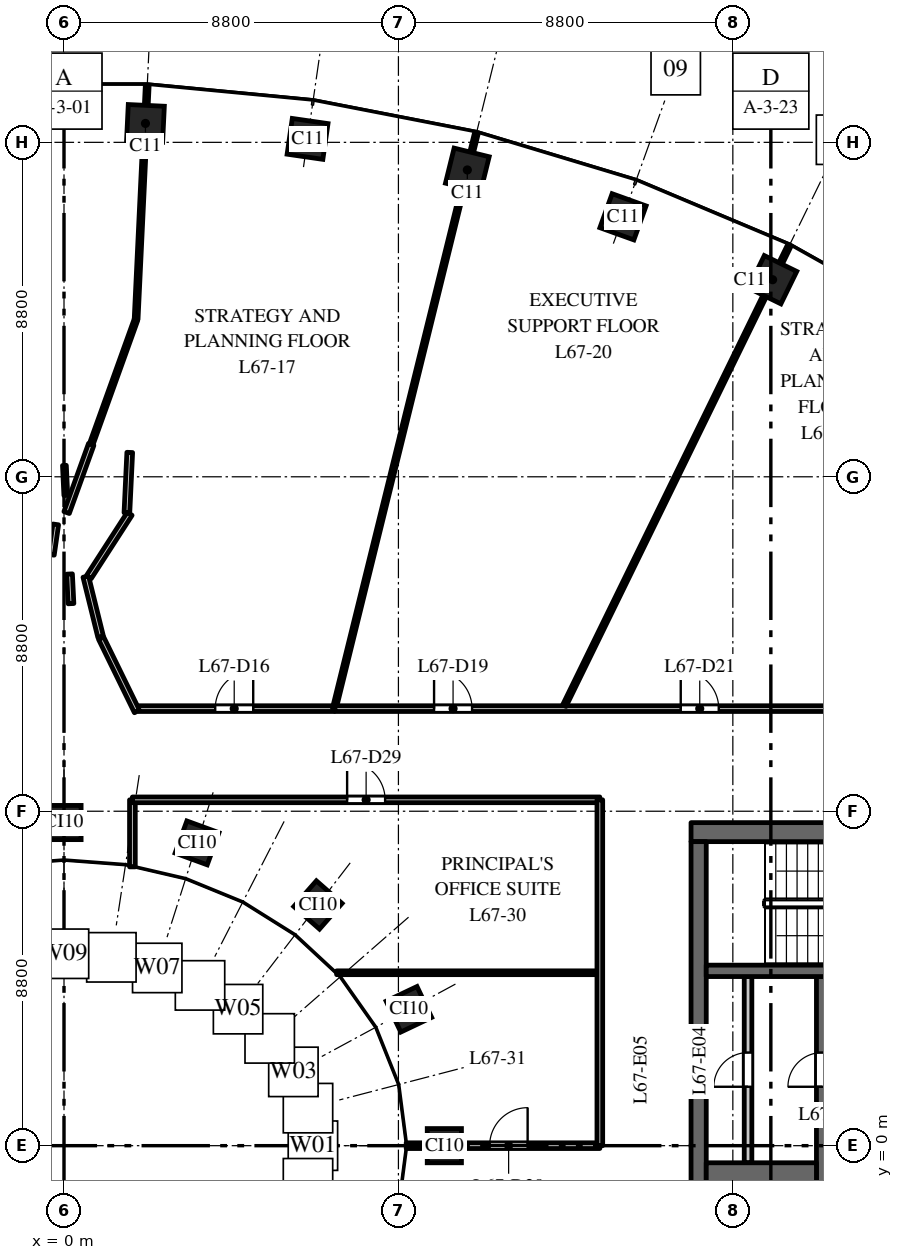
"""IFC4 building model, lengths in metres.
Left out: names, types, materials, properties, quantities, classifications, styles, units other than length and angle.
Written with IfcOpenShell. Run it as: python <this file> out.ifc"""

import sys

from ifc_helpers import new_model, si_unit, direction, frame, frame_2d, origin, origin_2d, place, context, subcontext, project, spatial, rectangle, extrude, element, fill, save


model = new_model("IFC4")
c1 = context("Model", 3, precision=1e-05, world=origin(), true_north=direction((0.0, 1.0)))
c2 = subcontext(c1, "Body", "Model", "MODEL_VIEW")
j1 = project(units=[si_unit("LENGTHUNIT", "METRE"), si_unit("PLANEANGLEUNIT", "RADIAN")], contexts=[c1])
p1 = place(None, origin())
s1 = spatial("IfcSite", under=j1, at=p1, CompositionType="ELEMENT")
p2 = place(p1, origin())
s2 = spatial("IfcBuilding", under=s1, at=p2, CompositionType="ELEMENT")
p3 = place(p2, frame((0.0, 0.0, 311.0)))
s3 = spatial("IfcBuildingStorey", under=s2, at=p3, CompositionType="ELEMENT", Elevation=311.0)
for number, where, z_axis, x_axis in (
    (1, (18.646, 22.785, 0.0), (0.0, 0.0, 1.0), (-0.898, 0.439, 0.0)),
    (2, (14.709, 24.441, 0.0), (0.0, 0.0, 1.0), (-0.941, 0.338, 0.0)),
    (3, (10.613, 25.674, 0.0), (0.0, 0.0, 1.0), (-0.971, 0.24, 0.0)),
    (4, (6.409, 26.491, 0.0), (0.0, 0.0, 1.0), (-0.99, 0.143, 0.0)),
    (5, (2.143, 26.898, 0.0), (0.0, 0.0, 1.0), (-0.999, 0.048, 0.0)),
):
    element("IfcColumn", number, at=place(p3, frame(where, z_axis=z_axis, x_axis=x_axis)), inside=s3, PredefinedType="COLUMN", context=c2, shape_type="SweptSolid", body=[
        extrude(rectangle(XDim=0.95, YDim=0.95, at=origin_2d()), origin(), (0.0, 0.0, 1.0), 4.0),
    ])
for number, where, z_axis, x_axis in (
    (6, (10.008, 0.0, 0.0), (0.0, 0.0, 1.0), (0.0, 1.0, 0.0)),
    (7, (9.076, 3.588, 0.0), (0.0, 0.0, 1.0), (-0.429, 0.903, 0.0)),
    (8, (6.682, 6.334, 0.0), (0.0, 0.0, 1.0), (-0.751, 0.66, 0.0)),
    (9, (3.501, 7.967, 0.0), (0.0, 0.0, 1.0), (-0.939, 0.344, 0.0)),
    (10, (0.0, 8.503, 0.0), (0.0, 0.0, 1.0), (-1.0, 0.0, 0.0)),
):
    element("IfcColumn", number, at=place(p3, frame(where, z_axis=z_axis, x_axis=x_axis)), inside=s3, PredefinedType="COLUMN", context=c2, shape_type="SweptSolid", body=[
        extrude(rectangle(XDim=0.9, YDim=0.9, at=origin_2d()), origin(), (0.0, 0.0, 1.0), 4.0),
    ])
p4 = place(p3, frame((16.5, 8.25, 0.0), z_axis=(0.0, 0.0, 1.0), x_axis=(1.0, 0.0, 0.0)))
e11 = element("IfcWall", 11, at=p4, inside=s3, PredefinedType="SHEAR", context=c2, shape_type="SweptSolid", body=[
    extrude(rectangle(XDim=15.0, YDim=0.5, at=frame_2d((7.5, 0.0))), origin(), (0.0, 0.0, 1.0), 3.7),
])
p5 = place(p4, frame((6.9, 0.0, 0.0)))
e12 = element("IfcOpeningElement", 12, at=p5, cuts=e11, PredefinedType="OPENING", context=c2, shape_type="SweptSolid", body=[
    extrude(rectangle(XDim=1.2, YDim=2.1, at=frame_2d((0.6, 1.05))), frame((0.0, 0.26, 0.0), z_axis=(0.0, -1.0, 0.0), x_axis=(1.0, 0.0, 0.0)), (0.0, 0.0, 1.0), 0.52),
])
p6 = place(p4, frame((12.95, 0.0, 0.0)))
e13 = element("IfcOpeningElement", 13, at=p6, cuts=e11, PredefinedType="OPENING", context=c2, shape_type="SweptSolid", body=[
    extrude(rectangle(XDim=0.9, YDim=2.1, at=frame_2d((0.45, 1.05))), frame((0.0, 0.26, 0.0), z_axis=(0.0, -1.0, 0.0), x_axis=(1.0, 0.0, 0.0)), (0.0, 0.0, 1.0), 0.52),
])
p7 = place(p3, frame((18.0, -0.45, 0.0), z_axis=(0.0, 0.0, 1.0), x_axis=(0.0, 1.0, 0.0)))
e14 = element("IfcWall", 14, at=p7, inside=s3, PredefinedType="PARTITIONING", context=c2, shape_type="SweptSolid", body=[
    extrude(rectangle(XDim=4.9, YDim=0.2, at=frame_2d((2.45, 0.0))), origin(), (0.0, 0.0, 1.0), 3.7),
])
p8 = place(p7, frame((2.0, 0.0, 0.0)))
e15 = element("IfcOpeningElement", 15, at=p8, cuts=e14, PredefinedType="OPENING", context=c2, shape_type="SweptSolid", body=[
    extrude(rectangle(XDim=0.9, YDim=2.1, at=frame_2d((0.45, 1.05))), frame((0.0, 0.11, 0.0), z_axis=(0.0, -1.0, 0.0), x_axis=(1.0, 0.0, 0.0)), (0.0, 0.0, 1.0), 0.22),
])
p9 = place(p3, frame((19.95, -4.45, 0.0), z_axis=(0.0, 0.0, 1.0), x_axis=(0.0, 1.0, 0.0)))
e16 = element("IfcWall", 16, at=p9, inside=s3, PredefinedType="SHEAR", context=c2, shape_type="SweptSolid", body=[
    extrude(rectangle(XDim=8.9, YDim=0.3, at=frame_2d((4.45, 0.0))), origin(), (0.0, 0.0, 1.0), 3.7),
])
p10 = place(p9, frame((0.775, 0.0, 0.0)))
e17 = element("IfcOpeningElement", 17, at=p10, cuts=e16, PredefinedType="OPENING", context=c2, shape_type="SweptSolid", body=[
    extrude(rectangle(XDim=1.2, YDim=2.1, at=frame_2d((0.6, 1.05))), frame((0.0, 0.16, 0.0), z_axis=(0.0, -1.0, 0.0), x_axis=(1.0, 0.0, 0.0)), (0.0, 0.0, 1.0), 0.32),
])
p11 = place(p9, frame((6.0, 0.0, 0.0)))
e18 = element("IfcOpeningElement", 18, at=p11, cuts=e16, PredefinedType="OPENING", context=c2, shape_type="SweptSolid", body=[
    extrude(rectangle(XDim=0.9, YDim=2.1, at=frame_2d((0.45, 1.05))), frame((0.0, 0.16, 0.0), z_axis=(0.0, -1.0, 0.0), x_axis=(1.0, 0.0, 0.0)), (0.0, 0.0, 1.0), 0.32),
])
p12 = place(p3, frame((16.7, -8.0, 0.0), z_axis=(0.0, 0.0, 1.0), x_axis=(0.0, 1.0, 0.0)))
e19 = element("IfcWall", 19, at=p12, inside=s3, PredefinedType="SHEAR", context=c2, shape_type="SweptSolid", body=[
    extrude(rectangle(XDim=16.0, YDim=0.4, at=frame_2d((8.0, 0.0))), origin(), (0.0, 0.0, 1.0), 3.7),
])
p13 = place(p3, frame((16.9, -1.075, 0.0), z_axis=(0.0, 0.0, 1.0), x_axis=(1.0, 0.0, 0.0)))
e20 = element("IfcWall", 20, at=p13, inside=s3, PredefinedType="SHEAR", context=c2, shape_type="SweptSolid", body=[
    extrude(rectangle(XDim=2.9, YDim=1.25, at=frame_2d((1.45, 0.0))), origin(), (0.0, 0.0, 1.0), 3.7),
])
p14 = place(p3, frame((16.9, 4.6, 0.0), z_axis=(0.0, 0.0, 1.0), x_axis=(1.0, 0.0, 0.0)))
e21 = element("IfcWall", 21, at=p14, inside=s3, PredefinedType="SHEAR", context=c2, shape_type="SweptSolid", body=[
    extrude(rectangle(XDim=6.18, YDim=0.3, at=frame_2d((3.09, 0.0))), origin(), (0.0, 0.0, 1.0), 3.7),
])
p15 = place(p14, frame((4.9, 0.0, 0.0)))
e22 = element("IfcOpeningElement", 22, at=p15, cuts=e21, PredefinedType="OPENING", context=c2, shape_type="SweptSolid", body=[
    extrude(rectangle(XDim=1.1, YDim=2.1, at=frame_2d((0.55, 1.05))), frame((0.0, 0.16, 0.0), z_axis=(0.0, -1.0, 0.0), x_axis=(1.0, 0.0, 0.0)), (0.0, 0.0, 1.0), 0.32),
])
p16 = place(p3, frame((-0.332, 15.548, 0.0), z_axis=(0.0, 0.0, 1.0), x_axis=(0.14248004426, 0.989797674774, 0.0)))
e23 = element("IfcWall", 23, at=p16, inside=s3, PredefinedType="PARTITIONING", context=c2, shape_type="SweptSolid", body=[
    extrude(rectangle(XDim=0.807, YDim=0.15, at=frame_2d((0.404, 0.0))), origin(), (0.0, 0.0, 1.0), 3.7),
])
p17 = place(p3, frame((0.011, 17.899, 0.0), z_axis=(0.0, 0.0, 1.0), x_axis=(0.046862039633, -0.998901371128, 0.0)))
e24 = element("IfcWall", 24, at=p17, inside=s3, PredefinedType="PARTITIONING", context=c2, shape_type="SweptSolid", body=[
    extrude(rectangle(XDim=0.792, YDim=0.1, at=frame_2d((0.396, 0.0))), origin(), (0.0, 0.0, 1.0), 3.7),
])
p18 = place(p3, frame((0.069, 16.659, 0.0), z_axis=(0.0, 0.0, 1.0), x_axis=(0.339417840218, 0.940635705117, 0.0)))
e25 = element("IfcWall", 25, at=p18, inside=s3, PredefinedType="PARTITIONING", context=c2, shape_type="SweptSolid", body=[
    extrude(rectangle(XDim=1.906, YDim=0.15, at=frame_2d((0.953, 0.0))), origin(), (0.0, 0.0, 1.0), 3.7),
])
p19 = place(p3, frame((0.146, 15.042, 0.0), z_axis=(0.0, 0.0, 1.0), x_axis=(0.048768193835, -0.998810123732, 0.0)))
e26 = element("IfcWall", 26, at=p19, inside=s3, PredefinedType="PARTITIONING", context=c2, shape_type="SweptSolid", body=[
    extrude(rectangle(XDim=0.781, YDim=0.15, at=frame_2d((0.391, 0.0))), origin(), (0.0, 0.0, 1.0), 3.7),
])
p20 = place(p3, frame((0.573, 14.974, 0.0), z_axis=(0.0, 0.0, 1.0), x_axis=(0.239690117004, -0.970849446521, 0.0)))
e27 = element("IfcWall", 27, at=p20, inside=s3, PredefinedType="PARTITIONING", context=c2, shape_type="SweptSolid", body=[
    extrude(rectangle(XDim=1.636, YDim=0.15, at=frame_2d((0.818, 0.0))), origin(), (0.0, 0.0, 1.0), 3.7),
])
p21 = place(p3, frame((0.654, 14.961, 0.0), z_axis=(0.0, 0.0, 1.0), x_axis=(0.542163330295, 0.840273124218, 0.0)))
e28 = element("IfcWall", 28, at=p21, inside=s3, PredefinedType="PARTITIONING", context=c2, shape_type="SweptSolid", body=[
    extrude(rectangle(XDim=1.983, YDim=0.15, at=frame_2d((0.991, 0.0))), origin(), (0.0, 0.0, 1.0), 3.7),
])
p22 = place(p3, frame((0.714, 18.452, 0.0), z_axis=(0.0, 0.0, 1.0), x_axis=(0.338365217831, 0.941014866706, 0.0)))
e29 = element("IfcWall", 29, at=p22, inside=s3, PredefinedType="PARTITIONING", context=c2, shape_type="SweptSolid", body=[
    extrude(rectangle(XDim=3.49, YDim=0.1, at=frame_2d((1.745, 0.0))), origin(), (0.0, 0.0, 1.0), 3.7),
])
p23 = place(p3, frame((0.977, 13.353, 0.0), z_axis=(0.0, 0.0, 1.0), x_axis=(0.439324382849, -0.898328495949, 0.0)))
e30 = element("IfcWall", 30, at=p23, inside=s3, PredefinedType="PARTITIONING", context=c2, shape_type="SweptSolid", body=[
    extrude(rectangle(XDim=2.146, YDim=0.15, at=frame_2d((1.073, 0.0))), origin(), (0.0, 0.0, 1.0), 3.7),
])
p24 = place(p3, frame((1.655, 16.65, 0.0), z_axis=(0.0, 0.0, 1.0), x_axis=(0.047055382931, 0.998892281949, 0.0)))
e31 = element("IfcWall", 31, at=p24, inside=s3, PredefinedType="PARTITIONING", context=c2, shape_type="SweptSolid", body=[
    extrude(rectangle(XDim=1.593, YDim=0.15, at=frame_2d((0.796, 0.0))), origin(), (0.0, 0.0, 1.0), 3.7),
])
p25 = place(p3, frame((1.8, 7.336, 0.0), z_axis=(0.0, 0.0, 1.0), x_axis=(0.0, 1.0, 0.0)))
e32 = element("IfcWall", 32, at=p25, inside=s3, PredefinedType="PARTITIONING", context=c2, shape_type="SweptSolid", body=[
    extrude(rectangle(XDim=1.764, YDim=0.15, at=frame_2d((0.882, 0.0))), origin(), (0.0, 0.0, 1.0), 3.0),
])
p26 = place(p3, frame((1.8, 9.1, 0.0), z_axis=(0.0, 0.0, 1.0), x_axis=(1.0, 0.0, 0.0)))
e33 = element("IfcWall", 33, at=p26, inside=s3, PredefinedType="PARTITIONING", context=c2, shape_type="SweptSolid", body=[
    extrude(rectangle(XDim=12.3, YDim=0.15, at=frame_2d((6.15, 0.0))), origin(), (0.0, 0.0, 1.0), 2.85),
])
p27 = place(p26, frame((5.65, 0.0, 0.0)))
e34 = element("IfcOpeningElement", 34, at=p27, cuts=e33, PredefinedType="OPENING", context=c2, shape_type="SweptSolid", body=[
    extrude(rectangle(XDim=1.0, YDim=2.1, at=frame_2d((0.5, 1.05))), frame((0.0, 0.085, 0.0), z_axis=(0.0, -1.0, 0.0), x_axis=(1.0, 0.0, 0.0)), (0.0, 0.0, 1.0), 0.17),
])
p28 = place(p3, frame((1.966, 11.5, 0.0), z_axis=(0.0, 0.0, 1.0), x_axis=(1.0, 0.0, 0.0)))
e35 = element("IfcWall", 35, at=p28, inside=s3, PredefinedType="PARTITIONING", context=c2, shape_type="SweptSolid", body=[
    extrude(rectangle(XDim=5.146, YDim=0.15, at=frame_2d((2.573, 0.0))), origin(), (0.0, 0.0, 1.0), 2.85),
])
p29 = place(p28, frame((2.013, 0.0, 0.0)))
e36 = element("IfcOpeningElement", 36, at=p29, cuts=e35, PredefinedType="OPENING", context=c2, shape_type="SweptSolid", body=[
    extrude(rectangle(XDim=1.0, YDim=2.1, at=frame_2d((0.5, 1.05))), frame((0.0, 0.085, 0.0), z_axis=(0.0, -1.0, 0.0), x_axis=(1.0, 0.0, 0.0)), (0.0, 0.0, 1.0), 0.17),
])
p30 = place(p3, frame((1.898, 21.75, 0.0), z_axis=(0.0, 0.0, 1.0), x_axis=(0.047440765919, 0.998874052986, 0.0)))
e37 = element("IfcWall", 37, at=p30, inside=s3, PredefinedType="PARTITIONING", context=c2, shape_type="SweptSolid", body=[
    extrude(rectangle(XDim=6.155, YDim=0.1, at=frame_2d((3.077, 0.0))), origin(), (0.0, 0.0, 1.0), 3.0),
])
p31 = place(p3, frame((7.112, 11.5, 0.0), z_axis=(0.0, 0.0, 1.0), x_axis=(0.239787813873, 0.970825321218, 0.0)))
e38 = element("IfcWall", 38, at=p31, inside=s3, PredefinedType="PARTITIONING", context=c2, shape_type="SweptSolid", body=[
    extrude(rectangle(XDim=15.601, YDim=0.1, at=frame_2d((7.801, 0.0))), origin(), (0.0, 0.0, 1.0), 2.85),
])
p32 = place(p3, frame((7.129, 11.5, 0.0), z_axis=(0.0, 0.0, 1.0), x_axis=(1.0, 0.0, 0.0)))
e39 = element("IfcWall", 39, at=p32, inside=s3, PredefinedType="PARTITIONING", context=c2, shape_type="SweptSolid", body=[
    extrude(rectangle(XDim=24.371, YDim=0.15, at=frame_2d((12.186, 0.0))), origin(), (0.0, 0.0, 1.0), 2.75),
])
p33 = place(p32, frame((2.609, 0.0, 0.0)))
e40 = element("IfcOpeningElement", 40, at=p33, cuts=e39, PredefinedType="OPENING", context=c2, shape_type="SweptSolid", body=[
    extrude(rectangle(XDim=1.0, YDim=2.1, at=frame_2d((0.5, 1.05))), frame((0.0, 0.085, 0.0), z_axis=(0.0, -1.0, 0.0), x_axis=(1.0, 0.0, 0.0)), (0.0, 0.0, 1.0), 0.17),
])
p34 = place(p32, frame((9.1, 0.0, 0.0)))
e41 = element("IfcOpeningElement", 41, at=p34, cuts=e39, PredefinedType="OPENING", context=c2, shape_type="SweptSolid", body=[
    extrude(rectangle(XDim=1.0, YDim=2.1, at=frame_2d((0.5, 1.05))), frame((0.0, 0.085, 0.0), z_axis=(0.0, -1.0, 0.0), x_axis=(1.0, 0.0, 0.0)), (0.0, 0.0, 1.0), 0.17),
])
p35 = place(p32, frame((17.755, 0.0, 0.0)))
e42 = element("IfcOpeningElement", 42, at=p35, cuts=e39, PredefinedType="OPENING", context=c2, shape_type="SweptSolid", body=[
    extrude(rectangle(XDim=1.0, YDim=2.1, at=frame_2d((0.5, 1.05))), frame((0.0, 0.085, 0.0), z_axis=(0.0, -1.0, 0.0), x_axis=(1.0, 0.0, 0.0)), (0.0, 0.0, 1.0), 0.17),
])
p36 = place(p3, frame((7.174, 4.55, 0.0), z_axis=(0.0, 0.0, 1.0), x_axis=(1.0, 0.0, 0.0)))
e43 = element("IfcWall", 43, at=p36, inside=s3, PredefinedType="PARTITIONING", context=c2, shape_type="SweptSolid", body=[
    extrude(rectangle(XDim=6.851, YDim=0.1, at=frame_2d((3.425, 0.0))), origin(), (0.0, 0.0, 1.0), 2.75),
])
p37 = place(p3, frame((9.005, 0.0, 0.0), z_axis=(0.0, 0.0, 1.0), x_axis=(1.0, 0.0, 0.0)))
e44 = element("IfcWall", 44, at=p37, inside=s3, PredefinedType="PARTITIONING", context=c2, shape_type="SweptSolid", body=[
    extrude(rectangle(XDim=5.095, YDim=0.15, at=frame_2d((2.548, 0.0))), origin(), (0.0, 0.0, 1.0), 3.7),
])
p38 = place(p37, frame((2.195, 0.0, 0.0)))
e45 = element("IfcOpeningElement", 45, at=p38, cuts=e44, PredefinedType="OPENING", context=c2, shape_type="SweptSolid", body=[
    extrude(rectangle(XDim=1.0, YDim=2.1, at=frame_2d((0.5, 1.05))), frame((0.0, 0.085, 0.0), z_axis=(0.0, -1.0, 0.0), x_axis=(1.0, 0.0, 0.0)), (0.0, 0.0, 1.0), 0.17),
])
p39 = place(p3, frame((13.167, 11.579, 0.0), z_axis=(0.0, 0.0, 1.0), x_axis=(0.439238726833, 0.898370380661, 0.0)))
e46 = element("IfcWall", 46, at=p39, inside=s3, PredefinedType="PARTITIONING", context=c2, shape_type="SweptSolid", body=[
    extrude(rectangle(XDim=13.475, YDim=0.1, at=frame_2d((6.738, 0.0))), origin(), (0.0, 0.0, 1.0), 3.0),
])
p40 = place(p3, frame((14.1, 0.0, 0.0), z_axis=(0.0, 0.0, 1.0), x_axis=(0.0, 1.0, 0.0)))
e47 = element("IfcWall", 47, at=p40, inside=s3, PredefinedType="PARTITIONING", context=c2, shape_type="SweptSolid", body=[
    extrude(rectangle(XDim=9.1, YDim=0.15, at=frame_2d((4.55, 0.0))), origin(), (0.0, 0.0, 1.0), 2.75),
])
p41 = place(p11, origin())
e48 = element("IfcDoor", 48, at=p41, inside=s3, OperationType="SINGLE_SWING_RIGHT", PredefinedType="DOOR", context=c2, shape_type="SweptSolid", body=[
    extrude(rectangle(XDim=0.9, YDim=2.1, at=frame_2d((0.45, 1.05))), frame((0.0, 0.025, 0.0), z_axis=(0.0, -1.0, 0.0), x_axis=(1.0, 0.0, 0.0)), (0.0, 0.0, 1.0), 0.05),
])
fill(e18, e48)
p42 = place(p8, origin())
e49 = element("IfcDoor", 49, at=p42, inside=s3, OperationType="SINGLE_SWING_RIGHT", PredefinedType="DOOR", context=c2, shape_type="SweptSolid", body=[
    extrude(rectangle(XDim=0.9, YDim=2.1, at=frame_2d((0.45, 1.05))), frame((0.0, 0.025, 0.0), z_axis=(0.0, -1.0, 0.0), x_axis=(1.0, 0.0, 0.0)), (0.0, 0.0, 1.0), 0.05),
])
fill(e15, e49)
p43 = place(p29, origin())
e50 = element("IfcDoor", 50, at=p43, inside=s3, OperationType="SINGLE_SWING_RIGHT", PredefinedType="DOOR", context=c2, shape_type="SweptSolid", body=[
    extrude(rectangle(XDim=1.0, YDim=2.1, at=frame_2d((0.5, 1.05))), frame((0.0, 0.025, 0.0), z_axis=(0.0, -1.0, 0.0), x_axis=(1.0, 0.0, 0.0)), (0.0, 0.0, 1.0), 0.05),
])
fill(e36, e50)
p44 = place(p33, origin())
e51 = element("IfcDoor", 51, at=p44, inside=s3, OperationType="SINGLE_SWING_LEFT", PredefinedType="DOOR", context=c2, shape_type="SweptSolid", body=[
    extrude(rectangle(XDim=1.0, YDim=2.1, at=frame_2d((0.5, 1.05))), frame((0.0, 0.025, 0.0), z_axis=(0.0, -1.0, 0.0), x_axis=(1.0, 0.0, 0.0)), (0.0, 0.0, 1.0), 0.05),
])
fill(e40, e51)
p45 = place(p34, origin())
e52 = element("IfcDoor", 52, at=p45, inside=s3, OperationType="SINGLE_SWING_LEFT", PredefinedType="DOOR", context=c2, shape_type="SweptSolid", body=[
    extrude(rectangle(XDim=1.0, YDim=2.1, at=frame_2d((0.5, 1.05))), frame((0.0, 0.025, 0.0), z_axis=(0.0, -1.0, 0.0), x_axis=(1.0, 0.0, 0.0)), (0.0, 0.0, 1.0), 0.05),
])
fill(e41, e52)
p46 = place(p27, origin())
e53 = element("IfcDoor", 53, at=p46, inside=s3, OperationType="SINGLE_SWING_LEFT", PredefinedType="DOOR", context=c2, shape_type="SweptSolid", body=[
    extrude(rectangle(XDim=1.0, YDim=2.1, at=frame_2d((0.5, 1.05))), frame((0.0, 0.025, 0.0), z_axis=(0.0, -1.0, 0.0), x_axis=(1.0, 0.0, 0.0)), (0.0, 0.0, 1.0), 0.05),
])
fill(e34, e53)
p47 = place(p38, origin())
e54 = element("IfcDoor", 54, at=p47, inside=s3, OperationType="SINGLE_SWING_RIGHT", PredefinedType="DOOR", context=c2, shape_type="SweptSolid", body=[
    extrude(rectangle(XDim=1.0, YDim=2.1, at=frame_2d((0.5, 1.05))), frame((0.0, 0.025, 0.0), z_axis=(0.0, -1.0, 0.0), x_axis=(1.0, 0.0, 0.0)), (0.0, 0.0, 1.0), 0.05),
])
fill(e45, e54)
save(model, sys.argv[1])
